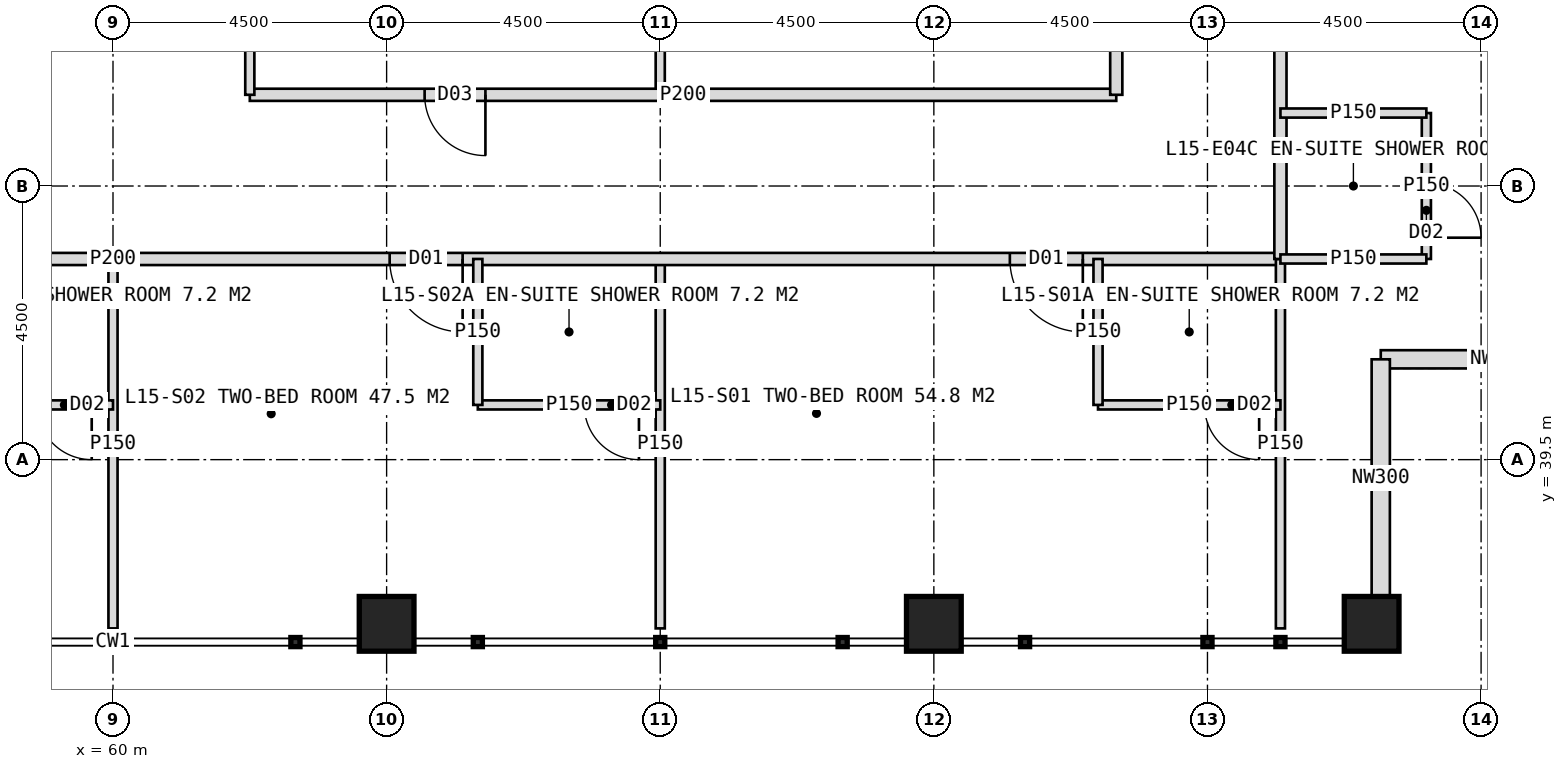
"""IFC4 building model, lengths in metres.
Left out: names, types, materials, properties, quantities, classifications, styles, units other than length and angle.
Written with IfcOpenShell. Run it as: python <this file> out.ifc"""

import sys

from ifc_helpers import new_model, si_unit, direction, frame, frame_2d, origin, origin_2d, place, context, subcontext, project, spatial, rectangle, hollow_rectangle, extrude, element, fill, save


model = new_model("IFC4")
c1 = context("Model", 3, precision=1e-05, world=origin(), true_north=direction((0.0, 1.0)))
c2 = subcontext(c1, "Body", "Model", "MODEL_VIEW")
j1 = project(units=[si_unit("LENGTHUNIT", "METRE"), si_unit("PLANEANGLEUNIT", "RADIAN")], contexts=[c1])
p1 = place(None, origin())
s1 = spatial("IfcSite", under=j1, at=p1, CompositionType="ELEMENT")
p2 = place(p1, origin())
s2 = spatial("IfcBuilding", under=s1, at=p2, CompositionType="ELEMENT")
p3 = place(p2, frame((0.0, 0.0, 67.0)))
s3 = spatial("IfcBuildingStorey", under=s2, at=p3, CompositionType="ELEMENT", Elevation=67.0)
for number, where, z_axis, x_axis in (
    (1, (64.5, 36.8, 0.0), (0.0, 0.0, 1.0), (1.0, 0.0, 0.0)),
    (2, (73.5, 36.8, 0.0), (0.0, 0.0, 1.0), (1.0, 0.0, 0.0)),
    (3, (80.7, 36.8, 0.0), (0.0, 0.0, 1.0), (1.0, 0.0, 0.0)),
):
    element("IfcColumn", number, at=place(p3, frame(where, z_axis=z_axis, x_axis=x_axis)), inside=s3, PredefinedType="COLUMN", context=c2, shape_type="SweptSolid", body=[
        extrude(hollow_rectangle(XDim=0.9, YDim=0.9, WallThickness=0.08, at=origin_2d()), origin(), (0.0, 0.0, 1.0), 4.0),
    ])
for number, where, z_axis, x_axis in (
    (4, (84.75, 41.15, 0.0), (0.0, 0.0, 1.0), (-1.0, 0.0, 0.0)),
    (5, (80.85, 41.15, 0.0), (0.0, 0.0, 1.0), (0.0, -1.0, 0.0)),
):
    element("IfcWall", number, at=place(p3, frame(where, z_axis=z_axis, x_axis=x_axis)), inside=s3, PredefinedType="ELEMENTEDWALL", context=c2, shape_type="SweptSolid", body=[
        extrude(rectangle(XDim=3.9, YDim=0.3, at=frame_2d((1.95, 0.0))), origin(), (0.0, 0.0, 1.0), 2.95),
    ])
p4 = place(p3, frame((69.0, 42.8, 0.0), z_axis=(0.0, 0.0, 1.0), x_axis=(0.0, -1.0, 0.0)))
e6 = element("IfcWall", 6, at=p4, inside=s3, PredefinedType="PARTITIONING", context=c2, shape_type="SweptSolid", body=[
    extrude(rectangle(XDim=6.075, YDim=0.15, at=frame_2d((3.038, 0.0))), origin(), (0.0, 0.0, 1.0), 3.75),
])
p5 = place(p3, frame((60.0, 42.8, 0.0), z_axis=(0.0, 0.0, 1.0), x_axis=(0.0, -1.0, 0.0)))
e7 = element("IfcWall", 7, at=p5, inside=s3, PredefinedType="PARTITIONING", context=c2, shape_type="SweptSolid", body=[
    extrude(rectangle(XDim=6.075, YDim=0.15, at=frame_2d((3.038, 0.0))), origin(), (0.0, 0.0, 1.0), 2.75),
])
p6 = place(p3, frame((79.2, 42.8, 0.0), z_axis=(0.0, 0.0, 1.0), x_axis=(-1.0, 0.0, 0.0)))
e8 = element("IfcWall", 8, at=p6, inside=s3, PredefinedType="PARTITIONING", context=c2, shape_type="SweptSolid", body=[
    extrude(rectangle(XDim=38.4, YDim=0.2, at=frame_2d((19.2, 0.0))), origin(), (0.0, 0.0, 1.0), 3.75),
])
p7 = place(p6, frame((3.25, 0.0, 0.0)))
e9 = element("IfcOpeningElement", 9, at=p7, cuts=e8, PredefinedType="OPENING", context=c2, shape_type="SweptSolid", body=[
    extrude(rectangle(XDim=1.2, YDim=2.2, at=frame_2d((0.6, 1.1))), frame((0.0, 0.11, 0.0), z_axis=(0.0, -1.0, 0.0), x_axis=(1.0, 0.0, 0.0)), (0.0, 0.0, 1.0), 0.22),
])
p8 = place(p6, frame((13.45, 0.0, 0.0)))
e10 = element("IfcOpeningElement", 10, at=p8, cuts=e8, PredefinedType="OPENING", context=c2, shape_type="SweptSolid", body=[
    extrude(rectangle(XDim=1.2, YDim=2.2, at=frame_2d((0.6, 1.1))), frame((0.0, 0.11, 0.0), z_axis=(0.0, -1.0, 0.0), x_axis=(1.0, 0.0, 0.0)), (0.0, 0.0, 1.0), 0.22),
])
p9 = place(p6, frame((22.45, 0.0, 0.0)))
e11 = element("IfcOpeningElement", 11, at=p9, cuts=e8, PredefinedType="OPENING", context=c2, shape_type="SweptSolid", body=[
    extrude(rectangle(XDim=1.2, YDim=2.2, at=frame_2d((0.6, 1.1))), frame((0.0, 0.11, 0.0), z_axis=(0.0, -1.0, 0.0), x_axis=(1.0, 0.0, 0.0)), (0.0, 0.0, 1.0), 0.22),
])
p10 = place(p6, frame((30.85, 0.0, 0.0)))
e12 = element("IfcOpeningElement", 12, at=p10, cuts=e8, PredefinedType="OPENING", context=c2, shape_type="SweptSolid", body=[
    extrude(rectangle(XDim=1.2, YDim=2.2, at=frame_2d((0.6, 1.1))), frame((0.0, 0.11, 0.0), z_axis=(0.0, -1.0, 0.0), x_axis=(1.0, 0.0, 0.0)), (0.0, 0.0, 1.0), 0.22),
])
p11 = place(p3, frame((79.2, 42.8, 0.0), z_axis=(0.0, 0.0, 1.0), x_axis=(0.0, -1.0, 0.0)))
e13 = element("IfcWall", 13, at=p11, inside=s3, PredefinedType="PARTITIONING", context=c2, shape_type="SweptSolid", body=[
    extrude(rectangle(XDim=6.075, YDim=0.15, at=frame_2d((3.038, 0.0))), origin(), (0.0, 0.0, 1.0), 3.75),
])
p12 = place(p3, frame((79.2, 40.4, 0.0), z_axis=(0.0, 0.0, 1.0), x_axis=(-1.0, 0.0, 0.0)))
e14 = element("IfcWall", 14, at=p12, inside=s3, PredefinedType="PARTITIONING", context=c2, shape_type="SweptSolid", body=[
    extrude(rectangle(XDim=3.0, YDim=0.15, at=frame_2d((1.5, 0.0))), origin(), (0.0, 0.0, 1.0), 3.75),
])
p13 = place(p12, frame((0.35, 0.0, 0.0)))
e15 = element("IfcOpeningElement", 15, at=p13, cuts=e14, PredefinedType="OPENING", context=c2, shape_type="SweptSolid", body=[
    extrude(rectangle(XDim=0.9, YDim=2.1, at=frame_2d((0.45, 1.05))), frame((0.0, 0.085, 0.0), z_axis=(0.0, -1.0, 0.0), x_axis=(1.0, 0.0, 0.0)), (0.0, 0.0, 1.0), 0.17),
])
p14 = place(p3, frame((76.2, 42.8, 0.0), z_axis=(0.0, 0.0, 1.0), x_axis=(0.0, -1.0, 0.0)))
e16 = element("IfcWall", 16, at=p14, inside=s3, PredefinedType="PARTITIONING", context=c2, shape_type="SweptSolid", body=[
    extrude(rectangle(XDim=2.4, YDim=0.15, at=frame_2d((1.2, 0.0))), origin(), (0.0, 0.0, 1.0), 3.75),
])
p15 = place(p3, frame((69.0, 40.4, 0.0), z_axis=(0.0, 0.0, 1.0), x_axis=(-1.0, 0.0, 0.0)))
e17 = element("IfcWall", 17, at=p15, inside=s3, PredefinedType="PARTITIONING", context=c2, shape_type="SweptSolid", body=[
    extrude(rectangle(XDim=3.0, YDim=0.15, at=frame_2d((1.5, 0.0))), origin(), (0.0, 0.0, 1.0), 3.75),
])
p16 = place(p15, frame((0.35, 0.0, 0.0)))
e18 = element("IfcOpeningElement", 18, at=p16, cuts=e17, PredefinedType="OPENING", context=c2, shape_type="SweptSolid", body=[
    extrude(rectangle(XDim=0.9, YDim=2.1, at=frame_2d((0.45, 1.05))), frame((0.0, 0.085, 0.0), z_axis=(0.0, -1.0, 0.0), x_axis=(1.0, 0.0, 0.0)), (0.0, 0.0, 1.0), 0.17),
])
p17 = place(p3, frame((66.0, 42.8, 0.0), z_axis=(0.0, 0.0, 1.0), x_axis=(0.0, -1.0, 0.0)))
e19 = element("IfcWall", 19, at=p17, inside=s3, PredefinedType="PARTITIONING", context=c2, shape_type="SweptSolid", body=[
    extrude(rectangle(XDim=2.4, YDim=0.15, at=frame_2d((1.2, 0.0))), origin(), (0.0, 0.0, 1.0), 3.75),
])
p18 = place(p3, frame((60.0, 40.4, 0.0), z_axis=(0.0, 0.0, 1.0), x_axis=(-1.0, 0.0, 0.0)))
e20 = element("IfcWall", 20, at=p18, inside=s3, PredefinedType="PARTITIONING", context=c2, shape_type="SweptSolid", body=[
    extrude(rectangle(XDim=3.0, YDim=0.15, at=frame_2d((1.5, 0.0))), origin(), (0.0, 0.0, 1.0), 3.75),
])
p19 = place(p18, frame((0.35, 0.0, 0.0)))
e21 = element("IfcOpeningElement", 21, at=p19, cuts=e20, PredefinedType="OPENING", context=c2, shape_type="SweptSolid", body=[
    extrude(rectangle(XDim=0.9, YDim=2.1, at=frame_2d((0.45, 1.05))), frame((0.0, 0.085, 0.0), z_axis=(0.0, -1.0, 0.0), x_axis=(1.0, 0.0, 0.0)), (0.0, 0.0, 1.0), 0.17),
])
p20 = place(p3, frame((69.0, 53.0, 0.0), z_axis=(0.0, 0.0, 1.0), x_axis=(0.0, -1.0, 0.0)))
e22 = element("IfcWall", 22, at=p20, inside=s3, PredefinedType="PARTITIONING", context=c2, shape_type="SweptSolid", body=[
    extrude(rectangle(XDim=7.5, YDim=0.15, at=frame_2d((3.75, 0.0))), origin(), (0.0, 0.0, 1.0), 3.75),
])
p21 = place(p3, frame((76.5, 45.5, 0.0), z_axis=(0.0, 0.0, 1.0), x_axis=(-1.0, 0.0, 0.0)))
e23 = element("IfcWall", 23, at=p21, inside=s3, PredefinedType="PARTITIONING", context=c2, shape_type="SweptSolid", body=[
    extrude(rectangle(XDim=14.25, YDim=0.2, at=frame_2d((7.125, 0.0))), origin(), (0.0, 0.0, 1.0), 3.75),
])
p22 = place(p21, frame((10.375, 0.0, 0.0)))
e24 = element("IfcOpeningElement", 24, at=p22, cuts=e23, PredefinedType="OPENING", context=c2, shape_type="SweptSolid", body=[
    extrude(rectangle(XDim=1.0, YDim=2.1, at=frame_2d((0.5, 1.05))), frame((0.0, 0.11, 0.0), z_axis=(0.0, -1.0, 0.0), x_axis=(1.0, 0.0, 0.0)), (0.0, 0.0, 1.0), 0.22),
])
p23 = place(p3, frame((62.25, 53.0, 0.0), z_axis=(0.0, 0.0, 1.0), x_axis=(0.0, -1.0, 0.0)))
e25 = element("IfcWall", 25, at=p23, inside=s3, PredefinedType="PARTITIONING", context=c2, shape_type="SweptSolid", body=[
    extrude(rectangle(XDim=7.5, YDim=0.15, at=frame_2d((3.75, 0.0))), origin(), (0.0, 0.0, 1.0), 3.75),
])
p24 = place(p3, frame((79.2, 81.2, 0.0), z_axis=(0.0, 0.0, 1.0), x_axis=(0.0, -1.0, 0.0)))
e26 = element("IfcWall", 26, at=p24, inside=s3, PredefinedType="PARTITIONING", context=c2, shape_type="SweptSolid", body=[
    extrude(rectangle(XDim=38.4, YDim=0.2, at=frame_2d((19.2, 0.0))), origin(), (0.0, 0.0, 1.0), 3.75),
])
p25 = place(p24, frame((3.25, 0.0, 0.0)))
e27 = element("IfcOpeningElement", 27, at=p25, cuts=e26, PredefinedType="OPENING", context=c2, shape_type="SweptSolid", body=[
    extrude(rectangle(XDim=1.2, YDim=2.2, at=frame_2d((0.6, 1.1))), frame((0.0, 0.11, 0.0), z_axis=(0.0, -1.0, 0.0), x_axis=(1.0, 0.0, 0.0)), (0.0, 0.0, 1.0), 0.22),
])
p26 = place(p24, frame((13.45, 0.0, 0.0)))
e28 = element("IfcOpeningElement", 28, at=p26, cuts=e26, PredefinedType="OPENING", context=c2, shape_type="SweptSolid", body=[
    extrude(rectangle(XDim=1.2, YDim=2.2, at=frame_2d((0.6, 1.1))), frame((0.0, 0.11, 0.0), z_axis=(0.0, -1.0, 0.0), x_axis=(1.0, 0.0, 0.0)), (0.0, 0.0, 1.0), 0.22),
])
p27 = place(p24, frame((21.85, 0.0, 0.0)))
e29 = element("IfcOpeningElement", 29, at=p27, cuts=e26, PredefinedType="OPENING", context=c2, shape_type="SweptSolid", body=[
    extrude(rectangle(XDim=1.2, YDim=2.2, at=frame_2d((0.6, 1.1))), frame((0.0, 0.11, 0.0), z_axis=(0.0, -1.0, 0.0), x_axis=(1.0, 0.0, 0.0)), (0.0, 0.0, 1.0), 0.22),
])
p28 = place(p24, frame((27.85, 0.0, 0.0)))
e30 = element("IfcOpeningElement", 30, at=p28, cuts=e26, PredefinedType="OPENING", context=c2, shape_type="SweptSolid", body=[
    extrude(rectangle(XDim=1.2, YDim=2.2, at=frame_2d((0.6, 1.1))), frame((0.0, 0.11, 0.0), z_axis=(0.0, -1.0, 0.0), x_axis=(1.0, 0.0, 0.0)), (0.0, 0.0, 1.0), 0.22),
])
p29 = place(p3, frame((81.6, 45.2, 0.0), z_axis=(0.0, 0.0, 1.0), x_axis=(0.0, -1.0, 0.0)))
e31 = element("IfcWall", 31, at=p29, inside=s3, PredefinedType="PARTITIONING", context=c2, shape_type="SweptSolid", body=[
    extrude(rectangle(XDim=2.4, YDim=0.15, at=frame_2d((1.2, 0.0))), origin(), (0.0, 0.0, 1.0), 3.75),
])
p30 = place(p29, frame((1.15, 0.0, 0.0)))
e32 = element("IfcOpeningElement", 32, at=p30, cuts=e31, PredefinedType="OPENING", context=c2, shape_type="SweptSolid", body=[
    extrude(rectangle(XDim=0.9, YDim=2.1, at=frame_2d((0.45, 1.05))), frame((0.0, 0.085, 0.0), z_axis=(0.0, -1.0, 0.0), x_axis=(1.0, 0.0, 0.0)), (0.0, 0.0, 1.0), 0.17),
])
for number, where, z_axis, x_axis in (
    (33, (79.2, 45.2, 0.0), (0.0, 0.0, 1.0), (1.0, 0.0, 0.0)),
    (34, (79.2, 42.8, 0.0), (0.0, 0.0, 1.0), (1.0, 0.0, 0.0)),
):
    element("IfcWall", number, at=place(p3, frame(where, z_axis=z_axis, x_axis=x_axis)), inside=s3, PredefinedType="PARTITIONING", context=c2, shape_type="SweptSolid", body=[
        extrude(rectangle(XDim=2.4, YDim=0.15, at=frame_2d((1.2, 0.0))), origin(), (0.0, 0.0, 1.0), 3.75),
    ])
p31 = place(p3, frame((76.5, 62.0, 0.0), z_axis=(0.0, 0.0, 1.0), x_axis=(0.0, -1.0, 0.0)))
e35 = element("IfcWall", 35, at=p31, inside=s3, PredefinedType="PARTITIONING", context=c2, shape_type="SweptSolid", body=[
    extrude(rectangle(XDim=16.5, YDim=0.2, at=frame_2d((8.25, 0.0))), origin(), (0.0, 0.0, 1.0), 3.75),
])
p32 = place(p31, frame((4.0, 0.0, 0.0)))
e36 = element("IfcOpeningElement", 36, at=p32, cuts=e35, PredefinedType="OPENING", context=c2, shape_type="SweptSolid", body=[
    extrude(rectangle(XDim=1.0, YDim=2.1, at=frame_2d((0.5, 1.05))), frame((0.0, 0.11, 0.0), z_axis=(0.0, -1.0, 0.0), x_axis=(1.0, 0.0, 0.0)), (0.0, 0.0, 1.0), 0.22),
])
p33 = place(p31, frame((12.25, 0.0, 0.0)))
e37 = element("IfcOpeningElement", 37, at=p33, cuts=e35, PredefinedType="OPENING", context=c2, shape_type="SweptSolid", body=[
    extrude(rectangle(XDim=1.0, YDim=2.1, at=frame_2d((0.5, 1.05))), frame((0.0, 0.11, 0.0), z_axis=(0.0, -1.0, 0.0), x_axis=(1.0, 0.0, 0.0)), (0.0, 0.0, 1.0), 0.22),
])
p34 = place(p7, origin())
e38 = element("IfcDoor", 38, at=p34, inside=s3, OperationType="SINGLE_SWING_LEFT", PredefinedType="DOOR", context=c2, shape_type="SweptSolid", body=[
    extrude(rectangle(XDim=1.2, YDim=2.2, at=frame_2d((0.6, 1.1))), frame((0.0, 0.025, 0.0), z_axis=(0.0, -1.0, 0.0), x_axis=(1.0, 0.0, 0.0)), (0.0, 0.0, 1.0), 0.05),
])
fill(e9, e38)
p35 = place(p13, origin())
e39 = element("IfcDoor", 39, at=p35, inside=s3, OperationType="SINGLE_SWING_LEFT", PredefinedType="DOOR", context=c2, shape_type="SweptSolid", body=[
    extrude(rectangle(XDim=0.9, YDim=2.1, at=frame_2d((0.45, 1.05))), frame((0.0, 0.025, 0.0), z_axis=(0.0, -1.0, 0.0), x_axis=(1.0, 0.0, 0.0)), (0.0, 0.0, 1.0), 0.05),
])
fill(e15, e39)
p36 = place(p8, origin())
e40 = element("IfcDoor", 40, at=p36, inside=s3, OperationType="SINGLE_SWING_LEFT", PredefinedType="DOOR", context=c2, shape_type="SweptSolid", body=[
    extrude(rectangle(XDim=1.2, YDim=2.2, at=frame_2d((0.6, 1.1))), frame((0.0, 0.025, 0.0), z_axis=(0.0, -1.0, 0.0), x_axis=(1.0, 0.0, 0.0)), (0.0, 0.0, 1.0), 0.05),
])
fill(e10, e40)
p37 = place(p16, origin())
e41 = element("IfcDoor", 41, at=p37, inside=s3, OperationType="SINGLE_SWING_LEFT", PredefinedType="DOOR", context=c2, shape_type="SweptSolid", body=[
    extrude(rectangle(XDim=0.9, YDim=2.1, at=frame_2d((0.45, 1.05))), frame((0.0, 0.025, 0.0), z_axis=(0.0, -1.0, 0.0), x_axis=(1.0, 0.0, 0.0)), (0.0, 0.0, 1.0), 0.05),
])
fill(e18, e41)
p38 = place(p19, origin())
e42 = element("IfcDoor", 42, at=p38, inside=s3, OperationType="SINGLE_SWING_LEFT", PredefinedType="DOOR", context=c2, shape_type="SweptSolid", body=[
    extrude(rectangle(XDim=0.9, YDim=2.1, at=frame_2d((0.45, 1.05))), frame((0.0, 0.025, 0.0), z_axis=(0.0, -1.0, 0.0), x_axis=(1.0, 0.0, 0.0)), (0.0, 0.0, 1.0), 0.05),
])
fill(e21, e42)
p39 = place(p22, origin())
e43 = element("IfcDoor", 43, at=p39, inside=s3, OperationType="SINGLE_SWING_LEFT", PredefinedType="DOOR", context=c2, shape_type="SweptSolid", body=[
    extrude(rectangle(XDim=1.0, YDim=2.1, at=frame_2d((0.5, 1.05))), frame((0.0, 0.025, 0.0), z_axis=(0.0, -1.0, 0.0), x_axis=(1.0, 0.0, 0.0)), (0.0, 0.0, 1.0), 0.05),
])
fill(e24, e43)
p40 = place(p30, origin())
e44 = element("IfcDoor", 44, at=p40, inside=s3, OperationType="SINGLE_SWING_RIGHT", PredefinedType="DOOR", context=c2, shape_type="SweptSolid", body=[
    extrude(rectangle(XDim=0.9, YDim=2.1, at=frame_2d((0.45, 1.05))), frame((0.0, 0.025, 0.0), z_axis=(0.0, -1.0, 0.0), x_axis=(1.0, 0.0, 0.0)), (0.0, 0.0, 1.0), 0.05),
])
fill(e32, e44)
save(model, sys.argv[1])
